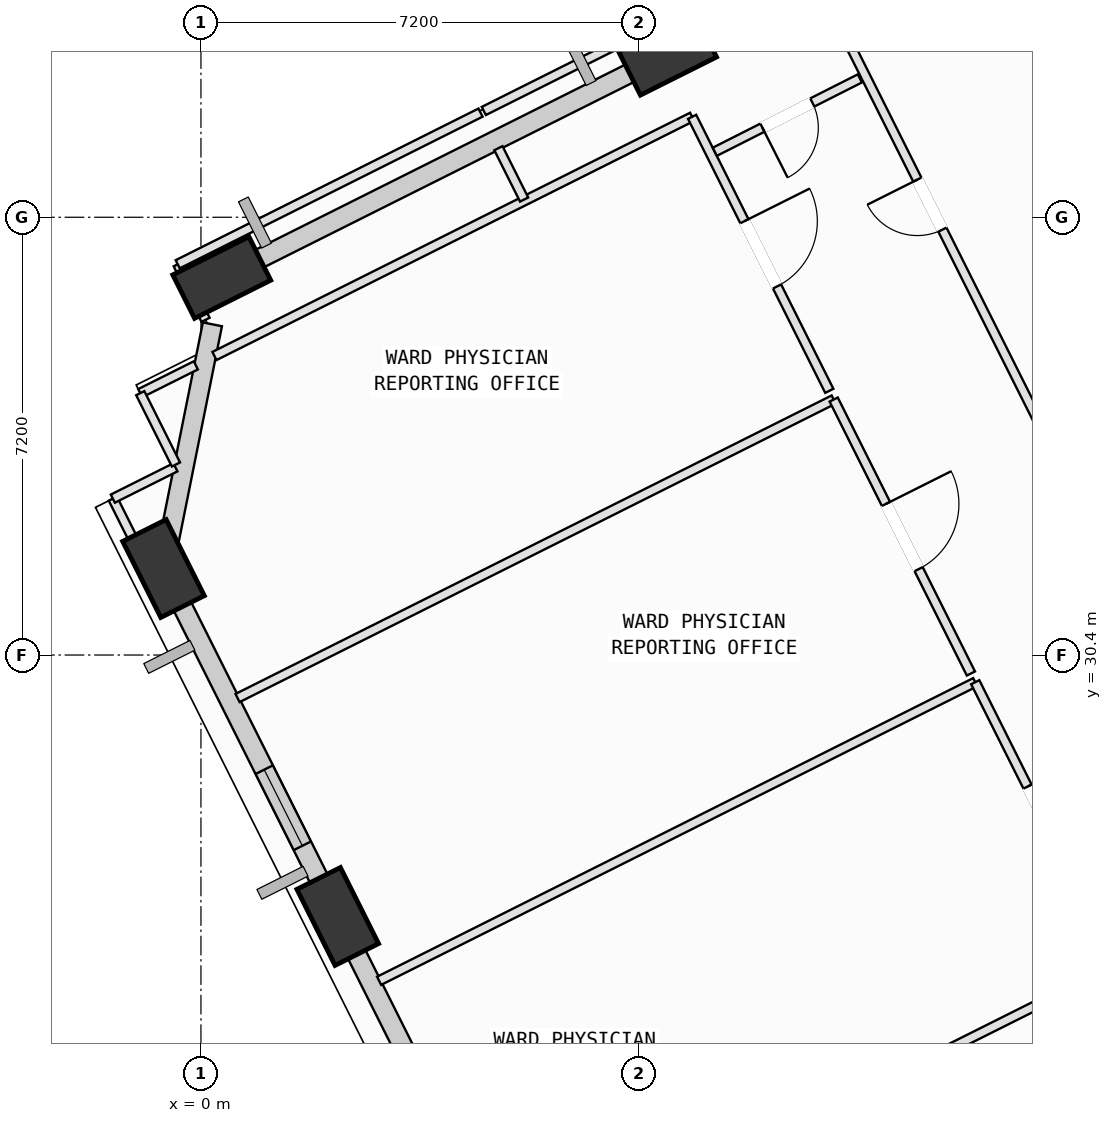
"""IFC4 building model, lengths in metres.
Left out: names, types, materials, properties, quantities, classifications, styles, units other than length and angle.
Written with IfcOpenShell. Run it as: python <this file> out.ifc"""

import sys

from ifc_helpers import new_model, si_unit, direction, frame, frame_2d, origin, origin_2d, place, context, subcontext, project, spatial, rectangle, extrude, element, fill, save


model = new_model("IFC4")
c1 = context("Model", 3, precision=1e-05, world=origin(), true_north=direction((0.0, 1.0)))
c2 = subcontext(c1, "Body", "Model", "MODEL_VIEW")
j1 = project(units=[si_unit("LENGTHUNIT", "METRE"), si_unit("PLANEANGLEUNIT", "RADIAN")], contexts=[c1])
p1 = place(None, origin())
s1 = spatial("IfcSite", under=j1, at=p1, CompositionType="ELEMENT")
p2 = place(p1, origin())
s2 = spatial("IfcBuilding", under=s1, at=p2, CompositionType="ELEMENT")
p3 = place(p2, frame((0.0, 0.0, 136.4)))
s3 = spatial("IfcBuildingStorey", under=s2, at=p3, CompositionType="ELEMENT", Elevation=136.4)
p4 = place(p3, frame((7.674, 40.28, 0.002), z_axis=(-0.062739809267, -0.107172930226, 0.992258877189), x_axis=(0.996113486721, -0.068307600286, 0.055605695)))
e1 = element("IfcColumn", 1, at=p4, inside=s3, PredefinedType="COLUMN", context=c2, shape_type="SweptSolid", body=[
    extrude(rectangle(XDim=1.4, YDim=0.8, at=origin_2d()), origin(), (0.0, 0.0, 1.0), 4.028),
])
p5 = place(p3, frame((0.342, 36.608, 0.002), z_axis=(-0.047270230349, -0.136793518259, 0.98947110048), x_axis=(0.989820714281, 0.126709664213, 0.0648044333)))
e2 = element("IfcColumn", 2, at=p5, inside=s3, PredefinedType="COLUMN", context=c2, shape_type="SweptSolid", body=[
    extrude(rectangle(XDim=1.4, YDim=0.8, at=origin_2d()), origin(), (0.0, 0.0, 1.0), 4.039),
])
p6 = place(p3, frame((-0.616, 31.823, 0.002), z_axis=(-0.027630407763, -0.140630915662, 0.98967646538), x_axis=(-0.268755906488, 0.954645429211, 0.128149784292)))
e3 = element("IfcColumn", 3, at=p6, inside=s3, PredefinedType="COLUMN", context=c2, shape_type="SweptSolid", body=[
    extrude(rectangle(XDim=1.4, YDim=0.8, at=origin_2d()), origin(), (0.0, 0.0, 1.0), 4.038),
])
p7 = place(p3, frame((2.25, 26.1, 0.002), z_axis=(-0.004301232882, -0.128915824962, 0.991646211847), x_axis=(-0.417942591827, 0.901122566633, 0.115334772911)))
e4 = element("IfcColumn", 4, at=p7, inside=s3, PredefinedType="COLUMN", context=c2, shape_type="SweptSolid", body=[
    extrude(rectangle(XDim=1.4, YDim=0.8, at=origin_2d()), origin(), (0.0, 0.0, 1.0), 4.03),
])
p8 = place(p3, frame((7.914, 40.4, 0.0), z_axis=(0.0, 0.0, 1.0), x_axis=(0.894156910211, 0.4477537492, 0.0)))
e5 = element("IfcWall", 5, at=p8, inside=s3, PredefinedType="SOLIDWALL", context=c2, shape_type="SweptSolid", body=[
    extrude(rectangle(XDim=7.231, YDim=0.32, at=frame_2d((3.615, 0.0))), origin(), (0.0, 0.0, 1.0), 3.165),
])
p9 = place(p3, frame((0.56, 36.717, 0.0), z_axis=(0.0, 0.0, 1.0), x_axis=(0.894165104668, 0.44773738463, 0.0)))
e6 = element("IfcWall", 6, at=p9, inside=s3, PredefinedType="SOLIDWALL", context=c2, shape_type="SweptSolid", body=[
    extrude(rectangle(XDim=7.27, YDim=0.32, at=frame_2d((3.635, 0.0))), origin(), (0.0, 0.0, 1.0), 3.165),
])
p10 = place(p3, frame((-0.575, 32.025, 0.0), z_axis=(0.0, 0.0, 1.0), x_axis=(0.196405832062, 0.980522691799, 0.0)))
e7 = element("IfcWall", 7, at=p10, inside=s3, PredefinedType="SOLIDWALL", context=c2, shape_type="SweptSolid", body=[
    extrude(rectangle(XDim=3.889, YDim=0.32, at=frame_2d((1.945, 0.0))), origin(), (0.0, 0.0, 1.0), 3.165),
])
p11 = place(p3, frame((2.137, 26.325, 0.0), z_axis=(0.0, 0.0, 1.0), x_axis=(-0.447714715176, 0.894176455637, 0.0)))
e8 = element("IfcWall", 8, at=p11, inside=s3, PredefinedType="SOLIDWALL", context=c2, shape_type="SweptSolid", body=[
    extrude(rectangle(XDim=5.456, YDim=0.32, at=frame_2d((2.728, 0.0))), origin(), (0.0, 0.0, 1.0), 3.165),
])
p12 = place(p11, frame((1.048, 0.0, 0.75)))
e9 = element("IfcOpeningElement", 9, at=p12, cuts=e8, PredefinedType="OPENING", context=c2, shape_type="SweptSolid", body=[
    extrude(rectangle(XDim=1.4, YDim=1.85, at=frame_2d((0.7, 0.925))), frame((0.0, 0.17, 0.0), z_axis=(0.0, -1.0, 0.0), x_axis=(1.0, 0.0, 0.0)), (0.0, 0.0, 1.0), 0.34),
])
p13 = place(p3, frame((5.087, 20.434, 0.0), z_axis=(0.0, 0.0, 1.0), x_axis=(-0.447768773835, 0.894149386388, 0.0)))
e10 = element("IfcWall", 10, at=p13, inside=s3, PredefinedType="SOLIDWALL", context=c2, shape_type="SweptSolid", body=[
    extrude(rectangle(XDim=5.628, YDim=0.32, at=frame_2d((2.814, 0.0))), origin(), (0.0, 0.0, 1.0), 3.165),
])
p14 = place(p13, frame((1.667, 0.0, 0.75)))
e11 = element("IfcOpeningElement", 11, at=p14, cuts=e10, PredefinedType="OPENING", context=c2, shape_type="SweptSolid", body=[
    extrude(rectangle(XDim=1.8, YDim=2.05, at=frame_2d((0.9, 1.025))), frame((0.0, 0.17, 0.0), z_axis=(0.0, -1.0, 0.0), x_axis=(1.0, 0.0, 0.0)), (0.0, 0.0, 1.0), 0.34),
])
p15 = place(p3, frame((5.203, 20.366, 0.0), z_axis=(0.0, 0.0, 1.0), x_axis=(0.894174650725, 0.447718319929, 0.0)))
e12 = element("IfcWall", 12, at=p15, inside=s3, PredefinedType="PARTITIONING", context=c2, shape_type="SweptSolid", body=[
    extrude(rectangle(XDim=11.027, YDim=0.15, at=frame_2d((5.514, 0.0))), origin(), (0.0, 0.0, 1.0), 3.78),
])
p16 = place(p3, frame((2.93, 25.042, 0.0), z_axis=(0.0, 0.0, 1.0), x_axis=(0.894101883429, 0.447863619921, 0.0)))
e13 = element("IfcWall", 13, at=p16, inside=s3, PredefinedType="PARTITIONING", context=c2, shape_type="SweptSolid", body=[
    extrude(rectangle(XDim=10.965, YDim=0.15, at=frame_2d((5.482, 0.0))), origin(), (0.0, 0.0, 1.0), 3.78),
])
p17 = place(p3, frame((12.734, 29.953, 0.0), z_axis=(0.0, 0.0, 1.0), x_axis=(0.447794738158, -0.894136383601, 0.0)))
e14 = element("IfcWall", 14, at=p17, inside=s3, PredefinedType="PARTITIONING", context=c2, shape_type="SweptSolid", body=[
    extrude(rectangle(XDim=5.041, YDim=0.15, at=frame_2d((2.52, 0.0))), origin(), (0.0, 0.0, 1.0), 3.78),
])
p18 = place(p17, frame((1.92, 0.0, 0.0)))
e15 = element("IfcOpeningElement", 15, at=p18, cuts=e14, PredefinedType="OPENING", context=c2, shape_type="SweptSolid", body=[
    extrude(rectangle(XDim=1.2, YDim=2.15, at=frame_2d((0.6, 1.075))), frame((0.0, 0.085, 0.0), z_axis=(0.0, -1.0, 0.0), x_axis=(1.0, 0.0, 0.0)), (0.0, 0.0, 1.0), 0.17),
])
p19 = place(p3, frame((0.602, 29.693, 0.0), z_axis=(0.0, 0.0, 1.0), x_axis=(0.894173203887, 0.447721209516, 0.0)))
e16 = element("IfcWall", 16, at=p19, inside=s3, PredefinedType="PARTITIONING", context=c2, shape_type="SweptSolid", body=[
    extrude(rectangle(XDim=10.964, YDim=0.15, at=frame_2d((5.482, 0.0))), origin(), (0.0, 0.0, 1.0), 3.78),
])
p20 = place(p3, frame((10.406, 34.602, 0.0), z_axis=(0.0, 0.0, 1.0), x_axis=(0.447852925086, -0.894107240488, 0.0)))
e17 = element("IfcWall", 17, at=p20, inside=s3, PredefinedType="PARTITIONING", context=c2, shape_type="SweptSolid", body=[
    extrude(rectangle(XDim=5.04, YDim=0.15, at=frame_2d((2.52, 0.0))), origin(), (0.0, 0.0, 1.0), 3.78),
])
p21 = place(p20, frame((1.92, 0.0, 0.0)))
e18 = element("IfcOpeningElement", 18, at=p21, cuts=e17, PredefinedType="OPENING", context=c2, shape_type="SweptSolid", body=[
    extrude(rectangle(XDim=1.2, YDim=2.15, at=frame_2d((0.6, 1.075))), frame((0.0, 0.085, 0.0), z_axis=(0.0, -1.0, 0.0), x_axis=(1.0, 0.0, 0.0)), (0.0, 0.0, 1.0), 0.17),
])
p22 = place(p3, frame((2.362, 25.363, 0.0), z_axis=(0.0, 0.0, 1.0), x_axis=(-0.448635657036, 0.89371474601, 0.0)))
e19 = element("IfcWall", 19, at=p22, inside=s3, PredefinedType="PARTITIONING", context=c2, shape_type="SweptSolid", body=[
    extrude(rectangle(XDim=0.961, YDim=0.15, at=frame_2d((0.48, 0.0))), origin(), (0.0, 0.0, 1.0), 3.165),
])
p23 = place(p3, frame((-0.998, 34.707, 0.0), z_axis=(0.0, 0.0, 1.0), x_axis=(0.894427191, 0.4472135955, 0.0)))
e20 = element("IfcWall", 20, at=p23, inside=s3, PredefinedType="PARTITIONING", context=c2, shape_type="SweptSolid", body=[
    extrude(rectangle(XDim=1.022, YDim=0.15, at=frame_2d((0.511, 0.0))), origin(), (0.0, 0.0, 1.0), 3.78),
])
p24 = place(p3, frame((0.222, 35.318, 0.0), z_axis=(0.0, 0.0, 1.0), x_axis=(0.89416026767, 0.447747044346, 0.0)))
e21 = element("IfcWall", 21, at=p24, inside=s3, PredefinedType="PARTITIONING", context=c2, shape_type="SweptSolid", body=[
    extrude(rectangle(XDim=8.786, YDim=0.15, at=frame_2d((4.393, 0.0))), origin(), (0.0, 0.0, 1.0), 3.78),
])
p25 = place(p3, frame((8.078, 39.252, 0.0), z_axis=(0.0, 0.0, 1.0), x_axis=(0.447639822216, -0.894213950666, 0.0)))
e22 = element("IfcWall", 22, at=p25, inside=s3, PredefinedType="PARTITIONING", context=c2, shape_type="SweptSolid", body=[
    extrude(rectangle(XDim=5.04, YDim=0.15, at=frame_2d((2.52, 0.0))), origin(), (0.0, 0.0, 1.0), 2.965),
])
p26 = place(p25, frame((1.92, 0.0, 0.0)))
e23 = element("IfcOpeningElement", 23, at=p26, cuts=e22, PredefinedType="OPENING", context=c2, shape_type="SweptSolid", body=[
    extrude(rectangle(XDim=1.2, YDim=2.15, at=frame_2d((0.6, 1.075))), frame((0.0, 0.085, 0.0), z_axis=(0.0, -1.0, 0.0), x_axis=(1.0, 0.0, 0.0)), (0.0, 0.0, 1.0), 0.17),
])
p27 = place(p3, frame((-0.512, 31.101, 0.0), z_axis=(0.0, 0.0, 1.0), x_axis=(-0.447820231844, 0.894123615587, 0.0)))
e24 = element("IfcWall", 24, at=p27, inside=s3, PredefinedType="PARTITIONING", context=c2, shape_type="SweptSolid", body=[
    extrude(rectangle(XDim=2.092, YDim=0.15, at=frame_2d((1.046, 0.0))), origin(), (0.0, 0.0, 1.0), 3.165),
])
p28 = place(p3, frame((-1.449, 32.972, 0.0), z_axis=(0.0, 0.0, 1.0), x_axis=(0.894214939721, 0.447637846456, 0.0)))
e25 = element("IfcWall", 25, at=p28, inside=s3, PredefinedType="PARTITIONING", context=c2, shape_type="SweptSolid", body=[
    extrude(rectangle(XDim=1.151, YDim=0.15, at=frame_2d((0.575, 0.0))), origin(), (0.0, 0.0, 1.0), 3.78),
])
p29 = place(p3, frame((-0.411, 33.534, 0.0), z_axis=(0.0, 0.0, 1.0), x_axis=(-0.447585769474, 0.894241007203, 0.0)))
e26 = element("IfcWall", 26, at=p29, inside=s3, PredefinedType="PARTITIONING", context=c2, shape_type="SweptSolid", body=[
    extrude(rectangle(XDim=1.312, YDim=0.15, at=frame_2d((0.656, 0.0))), origin(), (0.0, 0.0, 1.0), 3.78),
])
p30 = place(p3, frame((13.783, 34.224, 0.0), z_axis=(0.0, 0.0, 1.0), x_axis=(-0.447846999207, 0.8941102087, 0.0)))
e27 = element("IfcWall", 27, at=p30, inside=s3, PredefinedType="PARTITIONING", context=c2, shape_type="SweptSolid", body=[
    extrude(rectangle(XDim=8.016, YDim=0.15, at=frame_2d((4.008, 0.0))), origin(), (0.0, 0.0, 1.0), 3.78),
])
p31 = place(p30, frame((3.548, 0.0, 0.0)))
e28 = element("IfcOpeningElement", 28, at=p31, cuts=e27, PredefinedType="OPENING", context=c2, shape_type="SweptSolid", body=[
    extrude(rectangle(XDim=0.92, YDim=2.1, at=frame_2d((0.46, 1.05))), frame((0.0, 0.085, 0.0), z_axis=(0.0, -1.0, 0.0), x_axis=(1.0, 0.0, 0.0)), (0.0, 0.0, 1.0), 0.17),
])
p32 = place(p3, frame((4.892, 38.736, 0.0), z_axis=(0.0, 0.0, 1.0), x_axis=(0.44752363119, -0.894272105976, 0.0)))
e29 = element("IfcWall", 29, at=p32, inside=s3, PredefinedType="PARTITIONING", context=c2, shape_type="SweptSolid", body=[
    extrude(rectangle(XDim=0.945, YDim=0.15, at=frame_2d((0.472, 0.0))), origin(), (0.0, 0.0, 1.0), 3.78),
])
p33 = place(p3, frame((0.076, 35.913, 0.0), z_axis=(0.0, 0.0, 1.0), x_axis=(-0.448073230872, 0.893996856692, 0.0)))
e30 = element("IfcWall", 30, at=p33, inside=s3, PredefinedType="PARTITIONING", context=c2, shape_type="SweptSolid", body=[
    extrude(rectangle(XDim=1.022, YDim=0.15, at=frame_2d((0.511, 0.0))), origin(), (0.0, 0.0, 1.0), 2.965),
])
p34 = place(p3, frame((-0.382, 36.827, 0.0), z_axis=(0.0, 0.0, 1.0), x_axis=(0.894128920136, 0.447809640558, 0.0)))
e31 = element("IfcWall", 31, at=p34, inside=s3, PredefinedType="PARTITIONING", context=c2, shape_type="SweptSolid", body=[
    extrude(rectangle(XDim=5.57, YDim=0.15, at=frame_2d((2.785, 0.0))), origin(), (0.0, 0.0, 1.0), 3.78),
])
p35 = place(p3, frame((4.652, 39.348, 0.0), z_axis=(0.0, 0.0, 1.0), x_axis=(0.894119355957, 0.447828736575, 0.0)))
e32 = element("IfcWall", 32, at=p35, inside=s3, PredefinedType="PARTITIONING", context=c2, shape_type="SweptSolid", body=[
    extrude(rectangle(XDim=6.19, YDim=0.15, at=frame_2d((3.095, 0.0))), origin(), (0.0, 0.0, 1.0), 3.78),
])
p36 = place(p3, frame((10.837, 39.884, 0.0), z_axis=(0.0, 0.0, 1.0), x_axis=(-0.892317330031, -0.451408664655, 0.0)))
e33 = element("IfcWall", 33, at=p36, inside=s3, PredefinedType="PARTITIONING", context=c2, shape_type="SweptSolid", body=[
    extrude(rectangle(XDim=2.674, YDim=0.15, at=frame_2d((1.337, 0.0))), origin(), (0.0, 0.0, 1.0), 3.78),
])
p37 = place(p36, frame((0.877, 0.0, 0.0)))
e34 = element("IfcOpeningElement", 34, at=p37, cuts=e33, PredefinedType="OPENING", context=c2, shape_type="SweptSolid", body=[
    extrude(rectangle(XDim=0.92, YDim=2.1, at=frame_2d((0.46, 1.05))), frame((0.0, 0.085, 0.0), z_axis=(0.0, -1.0, 0.0), x_axis=(1.0, 0.0, 0.0)), (0.0, 0.0, 1.0), 0.17),
])
p38 = place(p12, origin())
e35 = element("IfcWindow", 35, at=p38, inside=s3, PartitioningType="SINGLE_PANEL", PredefinedType="WINDOW", context=c2, shape_type="SweptSolid", body=[
    extrude(rectangle(XDim=1.4, YDim=1.85, at=frame_2d((0.7, 0.925))), frame((0.0, 0.03, 0.0), z_axis=(0.0, -1.0, 0.0), x_axis=(1.0, 0.0, 0.0)), (0.0, 0.0, 1.0), 0.06),
])
fill(e9, e35)
p39 = place(p18, origin())
e36 = element("IfcDoor", 36, at=p39, inside=s3, OperationType="SINGLE_SWING_LEFT", PredefinedType="DOOR", context=c2, shape_type="SweptSolid", body=[
    extrude(rectangle(XDim=1.2, YDim=2.15, at=frame_2d((0.6, 1.075))), frame((0.0, 0.025, 0.0), z_axis=(0.0, -1.0, 0.0), x_axis=(1.0, 0.0, 0.0)), (0.0, 0.0, 1.0), 0.05),
])
fill(e15, e36)
p40 = place(p21, origin())
e37 = element("IfcDoor", 37, at=p40, inside=s3, OperationType="SINGLE_SWING_LEFT", PredefinedType="DOOR", context=c2, shape_type="SweptSolid", body=[
    extrude(rectangle(XDim=1.2, YDim=2.15, at=frame_2d((0.6, 1.075))), frame((0.0, 0.025, 0.0), z_axis=(0.0, -1.0, 0.0), x_axis=(1.0, 0.0, 0.0)), (0.0, 0.0, 1.0), 0.05),
])
fill(e18, e37)
p41 = place(p26, origin())
e38 = element("IfcDoor", 38, at=p41, inside=s3, OperationType="SINGLE_SWING_LEFT", PredefinedType="DOOR", context=c2, shape_type="SweptSolid", body=[
    extrude(rectangle(XDim=1.2, YDim=2.15, at=frame_2d((0.6, 1.075))), frame((0.0, 0.025, 0.0), z_axis=(0.0, -1.0, 0.0), x_axis=(1.0, 0.0, 0.0)), (0.0, 0.0, 1.0), 0.05),
])
fill(e23, e38)
p42 = place(p31, origin())
e39 = element("IfcDoor", 39, at=p42, inside=s3, OperationType="SINGLE_SWING_RIGHT", PredefinedType="DOOR", context=c2, shape_type="SweptSolid", body=[
    extrude(rectangle(XDim=0.92, YDim=2.1, at=frame_2d((0.46, 1.05))), frame((0.0, 0.025, 0.0), z_axis=(0.0, -1.0, 0.0), x_axis=(1.0, 0.0, 0.0)), (0.0, 0.0, 1.0), 0.05),
])
fill(e28, e39)
p43 = place(p37, origin())
e40 = element("IfcDoor", 40, at=p43, inside=s3, OperationType="SINGLE_SWING_RIGHT", PredefinedType="DOOR", context=c2, shape_type="SweptSolid", body=[
    extrude(rectangle(XDim=0.92, YDim=2.1, at=frame_2d((0.46, 1.05))), frame((0.0, 0.025, 0.0), z_axis=(0.0, -1.0, 0.0), x_axis=(1.0, 0.0, 0.0)), (0.0, 0.0, 1.0), 0.05),
])
fill(e34, e40)
save(model, sys.argv[1])
